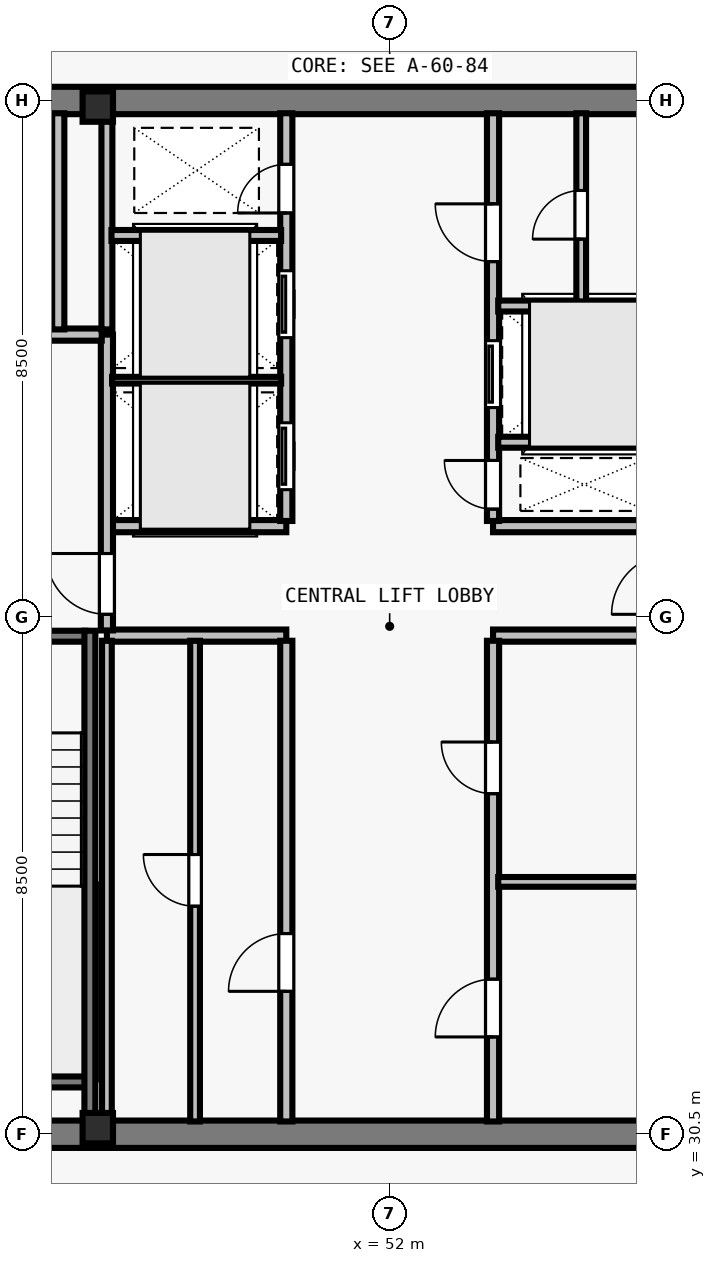
"""IFC4 building model, lengths in metres.
Left out: names, types, materials, properties, quantities, classifications, styles, units other than length and angle.
Written with IfcOpenShell. Run it as: python <this file> out.ifc"""

import sys

from ifc_helpers import new_model, si_unit, direction, frame, frame_2d, origin, origin_2d, place, context, subcontext, project, spatial, rectangle, i_section, extrude, element, fill, save


model = new_model("IFC4")
c1 = context("Model", 3, precision=1e-05, world=origin(), true_north=direction((0.0, 1.0)))
c2 = subcontext(c1, "Body", "Model", "MODEL_VIEW")
j1 = project(units=[si_unit("LENGTHUNIT", "METRE"), si_unit("PLANEANGLEUNIT", "RADIAN")], contexts=[c1])
p1 = place(None, origin())
s1 = spatial("IfcSite", under=j1, at=p1, CompositionType="ELEMENT")
p2 = place(p1, origin())
s2 = spatial("IfcBuilding", under=s1, at=p2, CompositionType="ELEMENT")
p3 = place(p2, frame((0.0, 0.0, 294.5)))
s3 = spatial("IfcBuildingStorey", under=s2, at=p3, CompositionType="ELEMENT", Elevation=294.5)
for number, where, z_axis, x_axis in (
    (1, (47.2, 30.6, 0.0), (0.0, 0.0, 1.0), (1.0, 0.0, 0.0)),
    (2, (47.2, 47.4, 0.0), (0.0, 0.0, 1.0), (1.0, 0.0, 0.0)),
):
    element("IfcColumn", number, at=place(p3, frame(where, z_axis=z_axis, x_axis=x_axis)), inside=s3, PredefinedType="COLUMN", context=c2, shape_type="SweptSolid", body=[
        extrude(i_section(OverallWidth=0.5, OverallDepth=0.5, WebThickness=0.028, FlangeThickness=0.045, at=origin_2d()), origin(), (0.0, 0.0, 1.0), 3.5),
    ])
for number, where, z_axis, x_axis in (
    (3, (43.275, 30.5, 0.0), (0.0, 0.0, 1.0), (1.0, 0.0, 0.0)),
    (4, (43.275, 47.5, 0.0), (0.0, 0.0, 1.0), (1.0, 0.0, 0.0)),
):
    element("IfcWall", number, at=place(p3, frame(where, z_axis=z_axis, x_axis=x_axis)), inside=s3, PredefinedType="SHEAR", context=c2, shape_type="SweptSolid", body=[
        extrude(rectangle(XDim=17.45, YDim=0.45, at=frame_2d((8.725, 0.0))), origin(), (0.0, 0.0, 1.0), 3.29),
    ])
for number, where, z_axis, x_axis in (
    (5, (47.35, 38.7, 0.0), (0.0, 0.0, 1.0), (1.0, 0.0, 0.0)),
    (6, (47.35, 40.5, 0.0), (0.0, 0.0, 1.0), (1.0, 0.0, 0.0)),
    (7, (53.7, 38.7, 0.0), (0.0, 0.0, 1.0), (1.0, 0.0, 0.0)),
    (8, (53.7, 40.5, 0.0), (0.0, 0.0, 1.0), (1.0, 0.0, 0.0)),
):
    element("IfcWall", number, at=place(p3, frame(where, z_axis=z_axis, x_axis=x_axis)), inside=s3, PredefinedType="SOLIDWALL", context=c2, shape_type="SweptSolid", body=[
        extrude(rectangle(XDim=2.95, YDim=0.2, at=frame_2d((1.475, 0.0))), origin(), (0.0, 0.0, 1.0), 3.29),
    ])
p4 = place(p3, frame((50.3, 30.71, 0.0), z_axis=(0.0, 0.0, 1.0), x_axis=(0.0, 1.0, 0.0)))
e9 = element("IfcWall", 9, at=p4, inside=s3, PredefinedType="SOLIDWALL", context=c2, shape_type="SweptSolid", body=[
    extrude(rectangle(XDim=7.905, YDim=0.2, at=frame_2d((3.953, 0.0))), origin(), (0.0, 0.0, 1.0), 3.29),
])
p5 = place(p4, frame((2.14, 0.0, 0.0)))
e10 = element("IfcOpeningElement", 10, at=p5, cuts=e9, PredefinedType="OPENING", context=c2, shape_type="SweptSolid", body=[
    extrude(rectangle(XDim=0.95, YDim=2.12, at=frame_2d((0.475, 1.06))), frame((0.0, 0.11, 0.0), z_axis=(0.0, -1.0, 0.0), x_axis=(1.0, 0.0, 0.0)), (0.0, 0.0, 1.0), 0.22),
])
p6 = place(p3, frame((53.7, 30.71, 0.0), z_axis=(0.0, 0.0, 1.0), x_axis=(0.0, 1.0, 0.0)))
e11 = element("IfcWall", 11, at=p6, inside=s3, PredefinedType="SOLIDWALL", context=c2, shape_type="SweptSolid", body=[
    extrude(rectangle(XDim=7.905, YDim=0.2, at=frame_2d((3.953, 0.0))), origin(), (0.0, 0.0, 1.0), 3.29),
])
p7 = place(p6, frame((1.39, 0.0, 0.0)))
e12 = element("IfcOpeningElement", 12, at=p7, cuts=e11, PredefinedType="OPENING", context=c2, shape_type="SweptSolid", body=[
    extrude(rectangle(XDim=0.95, YDim=2.12, at=frame_2d((0.475, 1.06))), frame((0.0, 0.11, 0.0), z_axis=(0.0, -1.0, 0.0), x_axis=(1.0, 0.0, 0.0)), (0.0, 0.0, 1.0), 0.22),
])
p8 = place(p6, frame((5.39, 0.0, 0.0)))
e13 = element("IfcOpeningElement", 13, at=p8, cuts=e11, PredefinedType="OPENING", context=c2, shape_type="SweptSolid", body=[
    extrude(rectangle(XDim=0.85, YDim=2.12, at=frame_2d((0.425, 1.06))), frame((0.0, 0.11, 0.0), z_axis=(0.0, -1.0, 0.0), x_axis=(1.0, 0.0, 0.0)), (0.0, 0.0, 1.0), 0.22),
])
p9 = place(p3, frame((50.3, 40.585, 0.0), z_axis=(0.0, 0.0, 1.0), x_axis=(0.0, 1.0, 0.0)))
e14 = element("IfcWall", 14, at=p9, inside=s3, PredefinedType="SOLIDWALL", context=c2, shape_type="SweptSolid", body=[
    extrude(rectangle(XDim=6.705, YDim=0.2, at=frame_2d((3.353, 0.0))), origin(), (0.0, 0.0, 1.0), 3.29),
])
p10 = place(p9, frame((0.515, 0.0, 0.0)))
e15 = element("IfcOpeningElement", 15, at=p10, cuts=e14, PredefinedType="OPENING", context=c2, shape_type="SweptSolid", body=[
    extrude(rectangle(XDim=1.1, YDim=2.2, at=frame_2d((0.55, 1.1))), frame((0.0, 0.11, 0.0), z_axis=(0.0, -1.0, 0.0), x_axis=(1.0, 0.0, 0.0)), (0.0, 0.0, 1.0), 0.22),
])
p11 = place(p9, frame((3.015, 0.0, 0.0)))
e16 = element("IfcOpeningElement", 16, at=p11, cuts=e14, PredefinedType="OPENING", context=c2, shape_type="SweptSolid", body=[
    extrude(rectangle(XDim=1.1, YDim=2.2, at=frame_2d((0.55, 1.1))), frame((0.0, 0.11, 0.0), z_axis=(0.0, -1.0, 0.0), x_axis=(1.0, 0.0, 0.0)), (0.0, 0.0, 1.0), 0.22),
])
p12 = place(p9, frame((5.065, 0.0, 0.0)))
e17 = element("IfcOpeningElement", 17, at=p12, cuts=e14, PredefinedType="OPENING", context=c2, shape_type="SweptSolid", body=[
    extrude(rectangle(XDim=0.8, YDim=2.08, at=frame_2d((0.4, 1.04))), frame((0.0, 0.11, 0.0), z_axis=(0.0, -1.0, 0.0), x_axis=(1.0, 0.0, 0.0)), (0.0, 0.0, 1.0), 0.22),
])
p13 = place(p3, frame((53.7, 40.585, 0.0), z_axis=(0.0, 0.0, 1.0), x_axis=(0.0, 1.0, 0.0)))
e18 = element("IfcWall", 18, at=p13, inside=s3, PredefinedType="SOLIDWALL", context=c2, shape_type="SweptSolid", body=[
    extrude(rectangle(XDim=6.705, YDim=0.2, at=frame_2d((3.353, 0.0))), origin(), (0.0, 0.0, 1.0), 3.29),
])
p14 = place(p13, frame((0.195, 0.0, 0.0)))
e19 = element("IfcOpeningElement", 19, at=p14, cuts=e18, PredefinedType="OPENING", context=c2, shape_type="SweptSolid", body=[
    extrude(rectangle(XDim=0.8, YDim=2.08, at=frame_2d((0.4, 1.04))), frame((0.0, 0.11, 0.0), z_axis=(0.0, -1.0, 0.0), x_axis=(1.0, 0.0, 0.0)), (0.0, 0.0, 1.0), 0.22),
])
p15 = place(p13, frame((1.865, 0.0, 0.0)))
e20 = element("IfcOpeningElement", 20, at=p15, cuts=e18, PredefinedType="OPENING", context=c2, shape_type="SweptSolid", body=[
    extrude(rectangle(XDim=1.1, YDim=2.2, at=frame_2d((0.55, 1.1))), frame((0.0, 0.11, 0.0), z_axis=(0.0, -1.0, 0.0), x_axis=(1.0, 0.0, 0.0)), (0.0, 0.0, 1.0), 0.22),
])
p16 = place(p13, frame((4.265, 0.0, 0.0)))
e21 = element("IfcOpeningElement", 21, at=p16, cuts=e18, PredefinedType="OPENING", context=c2, shape_type="SweptSolid", body=[
    extrude(rectangle(XDim=0.95, YDim=2.12, at=frame_2d((0.475, 1.06))), frame((0.0, 0.11, 0.0), z_axis=(0.0, -1.0, 0.0), x_axis=(1.0, 0.0, 0.0)), (0.0, 0.0, 1.0), 0.22),
])
p17 = place(p3, frame((47.35, 38.785, 0.0), z_axis=(0.0, 0.0, 1.0), x_axis=(0.0, 1.0, 0.0)))
e22 = element("IfcWall", 22, at=p17, inside=s3, PredefinedType="SOLIDWALL", context=c2, shape_type="SweptSolid", body=[
    extrude(rectangle(XDim=4.865, YDim=0.2, at=frame_2d((2.433, 0.0))), origin(), (0.0, 0.0, 1.0), 3.29),
])
p18 = place(p17, frame((0.265, 0.0, 0.0)))
e23 = element("IfcOpeningElement", 23, at=p18, cuts=e22, PredefinedType="OPENING", context=c2, shape_type="SweptSolid", body=[
    extrude(rectangle(XDim=1.0, YDim=2.15, at=frame_2d((0.5, 1.075))), frame((0.0, 0.11, 0.0), z_axis=(0.0, -1.0, 0.0), x_axis=(1.0, 0.0, 0.0)), (0.0, 0.0, 1.0), 0.22),
])
p19 = place(p3, frame((43.71, 43.65, 0.0), z_axis=(0.0, 0.0, 1.0), x_axis=(1.0, 0.0, 0.0)))
e24 = element("IfcWall", 24, at=p19, inside=s3, PredefinedType="SOLIDWALL", context=c2, shape_type="SweptSolid", body=[
    extrude(rectangle(XDim=3.555, YDim=0.2, at=frame_2d((1.777, 0.0))), origin(), (0.0, 0.0, 1.0), 3.29),
])
p20 = place(p19, frame((1.16, 0.0, 0.0)))
e25 = element("IfcOpeningElement", 25, at=p20, cuts=e24, PredefinedType="OPENING", context=c2, shape_type="SweptSolid", body=[
    extrude(rectangle(XDim=1.1, YDim=2.2, at=frame_2d((0.55, 1.1))), frame((0.0, 0.11, 0.0), z_axis=(0.0, -1.0, 0.0), x_axis=(1.0, 0.0, 0.0)), (0.0, 0.0, 1.0), 0.22),
])
p21 = place(p3, frame((46.55, 43.735, 0.0), z_axis=(0.0, 0.0, 1.0), x_axis=(0.0, 1.0, 0.0)))
e26 = element("IfcWall", 26, at=p21, inside=s3, PredefinedType="SOLIDWALL", context=c2, shape_type="SweptSolid", body=[
    extrude(rectangle(XDim=3.555, YDim=0.2, at=frame_2d((1.777, 0.0))), origin(), (0.0, 0.0, 1.0), 3.29),
])
p22 = place(p3, frame((47.35, 30.71, 0.0), z_axis=(0.0, 0.0, 1.0), x_axis=(0.0, 1.0, 0.0)))
e27 = element("IfcWall", 27, at=p22, inside=s3, PredefinedType="PARTITIONING", context=c2, shape_type="SweptSolid", body=[
    extrude(rectangle(XDim=7.905, YDim=0.16, at=frame_2d((3.953, 0.0))), origin(), (0.0, 0.0, 1.0), 3.29),
])
p23 = place(p3, frame((48.8, 30.71, 0.0), z_axis=(0.0, 0.0, 1.0), x_axis=(0.0, 1.0, 0.0)))
e28 = element("IfcWall", 28, at=p23, inside=s3, PredefinedType="PARTITIONING", context=c2, shape_type="SweptSolid", body=[
    extrude(rectangle(XDim=7.905, YDim=0.16, at=frame_2d((3.953, 0.0))), origin(), (0.0, 0.0, 1.0), 3.29),
])
p24 = place(p23, frame((3.54, 0.0, 0.0)))
e29 = element("IfcOpeningElement", 29, at=p24, cuts=e28, PredefinedType="OPENING", context=c2, shape_type="SweptSolid", body=[
    extrude(rectangle(XDim=0.85, YDim=2.12, at=frame_2d((0.425, 1.06))), frame((0.0, 0.09, 0.0), z_axis=(0.0, -1.0, 0.0), x_axis=(1.0, 0.0, 0.0)), (0.0, 0.0, 1.0), 0.18),
])
p25 = place(p3, frame((53.785, 34.65, 0.0), z_axis=(0.0, 0.0, 1.0), x_axis=(1.0, 0.0, 0.0)))
e30 = element("IfcWall", 30, at=p25, inside=s3, PredefinedType="PARTITIONING", context=c2, shape_type="SweptSolid", body=[
    extrude(rectangle(XDim=2.8, YDim=0.16, at=frame_2d((1.4, 0.0))), origin(), (0.0, 0.0, 1.0), 3.29),
])
p26 = place(p3, frame((47.35, 43.735, 0.0), z_axis=(0.0, 0.0, 1.0), x_axis=(0.0, 1.0, 0.0)))
e31 = element("IfcWall", 31, at=p26, inside=s3, PredefinedType="SOLIDWALL", context=c2, shape_type="SweptSolid", body=[
    extrude(rectangle(XDim=3.555, YDim=0.18, at=frame_2d((1.777, 0.0))), origin(), (0.0, 0.0, 1.0), 3.29),
])
p27 = place(p3, frame((47.435, 42.9, 0.0), z_axis=(0.0, 0.0, 1.0), x_axis=(1.0, 0.0, 0.0)))
e32 = element("IfcWall", 32, at=p27, inside=s3, PredefinedType="PARTITIONING", context=c2, shape_type="SweptSolid", body=[
    extrude(rectangle(XDim=2.78, YDim=0.11, at=frame_2d((1.39, 0.0))), origin(), (0.0, 0.0, 1.0), 3.29),
])
p28 = place(p3, frame((47.425, 45.28, 0.0), z_axis=(0.0, 0.0, 1.0), x_axis=(1.0, 0.0, 0.0)))
e33 = element("IfcWall", 33, at=p28, inside=s3, PredefinedType="SOLIDWALL", context=c2, shape_type="SweptSolid", body=[
    extrude(rectangle(XDim=2.79, YDim=0.18, at=frame_2d((1.395, 0.0))), origin(), (0.0, 0.0, 1.0), 3.29),
])
p29 = place(p3, frame((53.785, 41.88, 0.0), z_axis=(0.0, 0.0, 1.0), x_axis=(1.0, 0.0, 0.0)))
e34 = element("IfcWall", 34, at=p29, inside=s3, PredefinedType="SOLIDWALL", context=c2, shape_type="SweptSolid", body=[
    extrude(rectangle(XDim=2.78, YDim=0.18, at=frame_2d((1.39, 0.0))), origin(), (0.0, 0.0, 1.0), 3.29),
])
p30 = place(p3, frame((53.785, 44.12, 0.0), z_axis=(0.0, 0.0, 1.0), x_axis=(1.0, 0.0, 0.0)))
e35 = element("IfcWall", 35, at=p30, inside=s3, PredefinedType="SOLIDWALL", context=c2, shape_type="SweptSolid", body=[
    extrude(rectangle(XDim=2.79, YDim=0.18, at=frame_2d((1.395, 0.0))), origin(), (0.0, 0.0, 1.0), 3.29),
])
p31 = place(p3, frame((55.15, 44.195, 0.0), z_axis=(0.0, 0.0, 1.0), x_axis=(0.0, 1.0, 0.0)))
e36 = element("IfcWall", 36, at=p31, inside=s3, PredefinedType="PARTITIONING", context=c2, shape_type="SweptSolid", body=[
    extrude(rectangle(XDim=3.095, YDim=0.16, at=frame_2d((1.547, 0.0))), origin(), (0.0, 0.0, 1.0), 3.29),
])
p32 = place(p31, frame((1.025, 0.0, 0.0)))
e37 = element("IfcOpeningElement", 37, at=p32, cuts=e36, PredefinedType="OPENING", context=c2, shape_type="SweptSolid", body=[
    extrude(rectangle(XDim=0.8, YDim=2.1, at=frame_2d((0.4, 1.05))), frame((0.0, 0.09, 0.0), z_axis=(0.0, -1.0, 0.0), x_axis=(1.0, 0.0, 0.0)), (0.0, 0.0, 1.0), 0.18),
])
p33 = place(p3, frame((43.715, 38.69, 0.0), z_axis=(0.0, 0.0, 1.0), x_axis=(1.0, 0.0, 0.0)))
e38 = element("IfcWall", 38, at=p33, inside=s3, PredefinedType="SOLIDWALL", context=c2, shape_type="SweptSolid", body=[
    extrude(rectangle(XDim=3.28, YDim=0.18, at=frame_2d((1.64, 0.0))), origin(), (0.0, 0.0, 1.0), 3.29),
])
p34 = place(p33, frame((1.165, 0.0, 0.0)))
e39 = element("IfcOpeningElement", 39, at=p34, cuts=e38, PredefinedType="OPENING", context=c2, shape_type="SweptSolid", body=[
    extrude(rectangle(XDim=0.95, YDim=2.15, at=frame_2d((0.475, 1.075))), frame((0.0, 0.1, 0.0), z_axis=(0.0, -1.0, 0.0), x_axis=(1.0, 0.0, 0.0)), (0.0, 0.0, 1.0), 0.2),
])
p35 = place(p3, frame((43.715, 31.36, 0.0), z_axis=(0.0, 0.0, 1.0), x_axis=(1.0, 0.0, 0.0)))
e40 = element("IfcWall", 40, at=p35, inside=s3, PredefinedType="SOLIDWALL", context=c2, shape_type="SweptSolid", body=[
    extrude(rectangle(XDim=3.28, YDim=0.18, at=frame_2d((1.64, 0.0))), origin(), (0.0, 0.0, 1.0), 3.29),
])
p36 = place(p3, frame((47.07, 38.78, 0.0), z_axis=(0.0, 0.0, 1.0), x_axis=(0.0, -1.0, 0.0)))
e41 = element("IfcWall", 41, at=p36, inside=s3, PredefinedType="SOLIDWALL", context=c2, shape_type="SweptSolid", body=[
    extrude(rectangle(XDim=8.067, YDim=0.18, at=frame_2d((4.034, 0.0))), origin(), (0.0, 0.0, 1.0), 3.29),
])
p37 = place(p18, origin())
e42 = element("IfcDoor", 42, at=p37, inside=s3, OperationType="SINGLE_SWING_RIGHT", PredefinedType="DOOR", context=c2, shape_type="SweptSolid", body=[
    extrude(rectangle(XDim=1.0, YDim=2.15, at=frame_2d((0.5, 1.075))), frame((0.0, 0.025, 0.0), z_axis=(0.0, -1.0, 0.0), x_axis=(1.0, 0.0, 0.0)), (0.0, 0.0, 1.0), 0.05),
])
fill(e23, e42)
p38 = place(p5, origin())
e43 = element("IfcDoor", 43, at=p38, inside=s3, OperationType="SINGLE_SWING_LEFT", PredefinedType="DOOR", context=c2, shape_type="SweptSolid", body=[
    extrude(rectangle(XDim=0.95, YDim=2.12, at=frame_2d((0.475, 1.06))), frame((0.0, 0.025, 0.0), z_axis=(0.0, -1.0, 0.0), x_axis=(1.0, 0.0, 0.0)), (0.0, 0.0, 1.0), 0.05),
])
fill(e10, e43)
p39 = place(p24, origin())
e44 = element("IfcDoor", 44, at=p39, inside=s3, OperationType="SINGLE_SWING_RIGHT", PredefinedType="DOOR", context=c2, shape_type="SweptSolid", body=[
    extrude(rectangle(XDim=0.85, YDim=2.12, at=frame_2d((0.425, 1.06))), frame((0.0, 0.025, 0.0), z_axis=(0.0, -1.0, 0.0), x_axis=(1.0, 0.0, 0.0)), (0.0, 0.0, 1.0), 0.05),
])
fill(e29, e44)
p40 = place(p7, origin())
e45 = element("IfcDoor", 45, at=p40, inside=s3, OperationType="SINGLE_SWING_LEFT", PredefinedType="DOOR", context=c2, shape_type="SweptSolid", body=[
    extrude(rectangle(XDim=0.95, YDim=2.12, at=frame_2d((0.475, 1.06))), frame((0.0, 0.025, 0.0), z_axis=(0.0, -1.0, 0.0), x_axis=(1.0, 0.0, 0.0)), (0.0, 0.0, 1.0), 0.05),
])
fill(e12, e45)
p41 = place(p8, origin())
e46 = element("IfcDoor", 46, at=p41, inside=s3, OperationType="SINGLE_SWING_RIGHT", PredefinedType="DOOR", context=c2, shape_type="SweptSolid", body=[
    extrude(rectangle(XDim=0.85, YDim=2.12, at=frame_2d((0.425, 1.06))), frame((0.0, 0.025, 0.0), z_axis=(0.0, -1.0, 0.0), x_axis=(1.0, 0.0, 0.0)), (0.0, 0.0, 1.0), 0.05),
])
fill(e13, e46)
p42 = place(p10, origin())
e47 = element("IfcDoor", 47, at=p42, inside=s3, OperationType="SLIDING_TO_LEFT", PredefinedType="DOOR", context=c2, shape_type="SweptSolid", body=[
    extrude(rectangle(XDim=1.1, YDim=2.2, at=frame_2d((0.55, 1.1))), frame((0.0, 0.025, 0.0), z_axis=(0.0, -1.0, 0.0), x_axis=(1.0, 0.0, 0.0)), (0.0, 0.0, 1.0), 0.05),
])
fill(e15, e47)
p43 = place(p11, origin())
e48 = element("IfcDoor", 48, at=p43, inside=s3, OperationType="SLIDING_TO_LEFT", PredefinedType="DOOR", context=c2, shape_type="SweptSolid", body=[
    extrude(rectangle(XDim=1.1, YDim=2.2, at=frame_2d((0.55, 1.1))), frame((0.0, 0.025, 0.0), z_axis=(0.0, -1.0, 0.0), x_axis=(1.0, 0.0, 0.0)), (0.0, 0.0, 1.0), 0.05),
])
fill(e16, e48)
p44 = place(p12, origin())
e49 = element("IfcDoor", 49, at=p44, inside=s3, OperationType="SINGLE_SWING_LEFT", PredefinedType="DOOR", context=c2, shape_type="SweptSolid", body=[
    extrude(rectangle(XDim=0.8, YDim=2.08, at=frame_2d((0.4, 1.04))), frame((0.0, 0.025, 0.0), z_axis=(0.0, -1.0, 0.0), x_axis=(1.0, 0.0, 0.0)), (0.0, 0.0, 1.0), 0.05),
])
fill(e17, e49)
p45 = place(p14, origin())
e50 = element("IfcDoor", 50, at=p45, inside=s3, OperationType="SINGLE_SWING_RIGHT", PredefinedType="DOOR", context=c2, shape_type="SweptSolid", body=[
    extrude(rectangle(XDim=0.8, YDim=2.08, at=frame_2d((0.4, 1.04))), frame((0.0, 0.025, 0.0), z_axis=(0.0, -1.0, 0.0), x_axis=(1.0, 0.0, 0.0)), (0.0, 0.0, 1.0), 0.05),
])
fill(e19, e50)
p46 = place(p15, origin())
e51 = element("IfcDoor", 51, at=p46, inside=s3, OperationType="SLIDING_TO_LEFT", PredefinedType="DOOR", context=c2, shape_type="SweptSolid", body=[
    extrude(rectangle(XDim=1.1, YDim=2.2, at=frame_2d((0.55, 1.1))), frame((0.0, 0.025, 0.0), z_axis=(0.0, -1.0, 0.0), x_axis=(1.0, 0.0, 0.0)), (0.0, 0.0, 1.0), 0.05),
])
fill(e20, e51)
p47 = place(p16, origin())
e52 = element("IfcDoor", 52, at=p47, inside=s3, OperationType="SINGLE_SWING_RIGHT", PredefinedType="DOOR", context=c2, shape_type="SweptSolid", body=[
    extrude(rectangle(XDim=0.95, YDim=2.12, at=frame_2d((0.475, 1.06))), frame((0.0, 0.025, 0.0), z_axis=(0.0, -1.0, 0.0), x_axis=(1.0, 0.0, 0.0)), (0.0, 0.0, 1.0), 0.05),
])
fill(e21, e52)
p48 = place(p32, origin())
e53 = element("IfcDoor", 53, at=p48, inside=s3, OperationType="SINGLE_SWING_LEFT", PredefinedType="DOOR", context=c2, shape_type="SweptSolid", body=[
    extrude(rectangle(XDim=0.8, YDim=2.1, at=frame_2d((0.4, 1.05))), frame((0.0, 0.025, 0.0), z_axis=(0.0, -1.0, 0.0), x_axis=(1.0, 0.0, 0.0)), (0.0, 0.0, 1.0), 0.05),
])
fill(e37, e53)
save(model, sys.argv[1])
